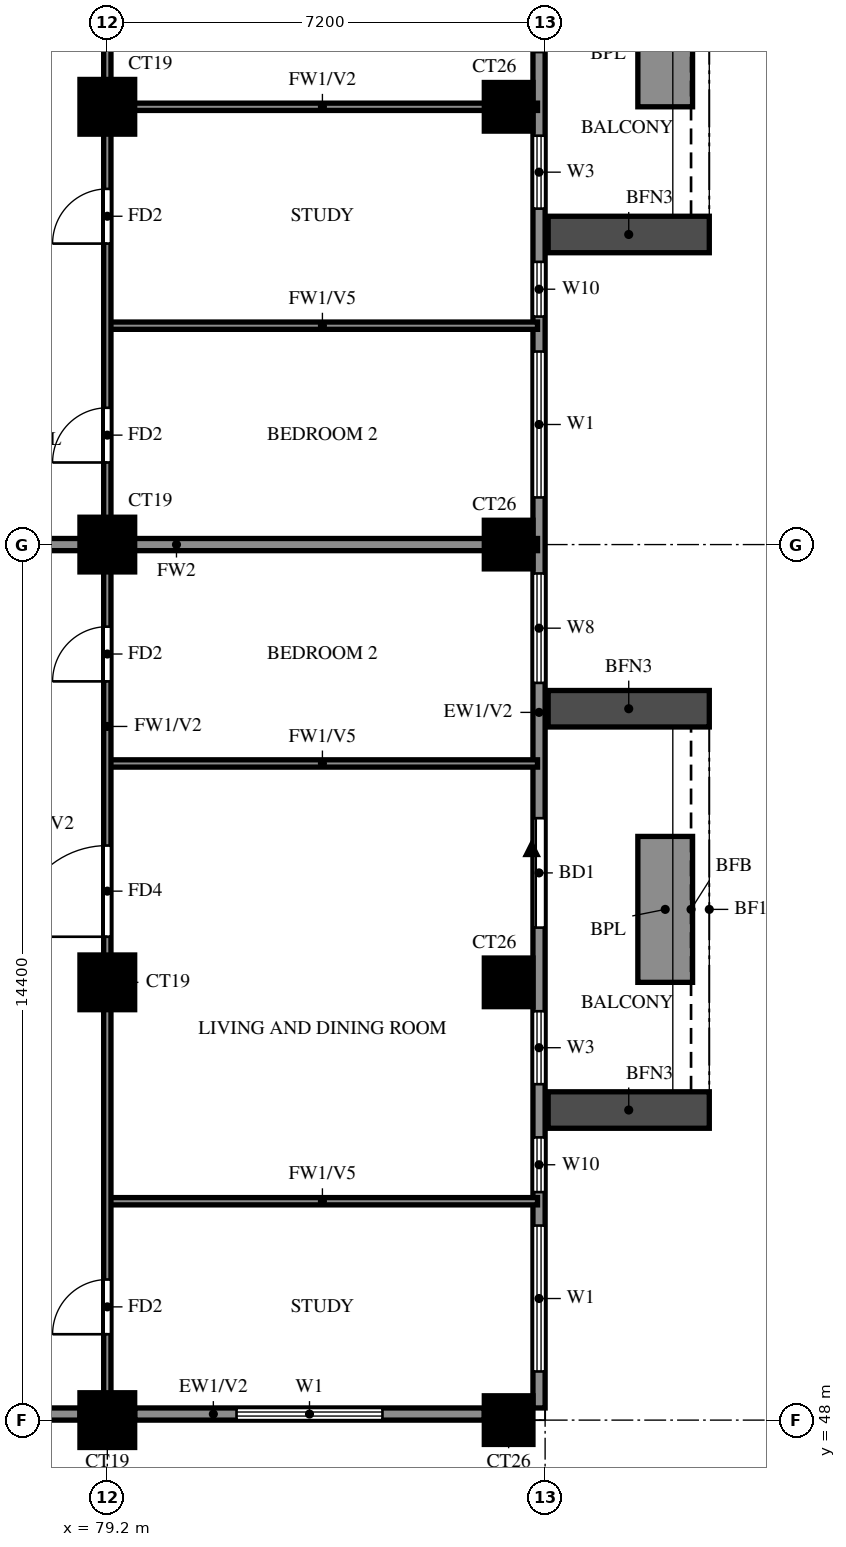
"""IFC4 building model, lengths in metres.
Left out: names, types, materials, properties, quantities, classifications, styles, units other than length and angle.
Written with IfcOpenShell. Run it as: python <this file> out.ifc"""

import sys

from ifc_helpers import new_model, si_unit, direction, frame, frame_2d, origin, origin_2d, place, context, subcontext, project, spatial, rectangle, extrude, source, transform, mapped, element, fill, save


model = new_model("IFC4")
c1 = context("Model", 3, precision=1e-05, world=origin(), true_north=direction((0.0, 1.0)))
c2 = subcontext(c1, "Body", "Model", "MODEL_VIEW")
j1 = project(units=[si_unit("LENGTHUNIT", "METRE"), si_unit("PLANEANGLEUNIT", "RADIAN")], contexts=[c1])
p1 = place(None, origin())
s1 = spatial("IfcSite", under=j1, at=p1, CompositionType="ELEMENT")
p2 = place(p1, origin())
s2 = spatial("IfcBuilding", under=s1, at=p2, CompositionType="ELEMENT")
p3 = place(p2, frame((0.0, 0.0, 185.0)))
s3 = spatial("IfcBuildingStorey", under=s2, at=p3, CompositionType="ELEMENT", Elevation=185.0)
m1 = source(origin(), c2, "Body", "SweptSolid", [
    extrude(rectangle(XDim=0.9, YDim=0.9, at=origin_2d()), origin(), (0.0, 0.0, 1.0), 3.2),
])
p4 = place(p3, frame((79.2, 48.0, 0.0), z_axis=(0.0, 0.0, 1.0), x_axis=(1.0, 0.0, 0.0)))
e1 = element("IfcColumn", 1, at=p4, inside=s3, PredefinedType="COLUMN", context=c2, shape_type="MappedRepresentation", body=[
    mapped(m1, transform((0.0, 0.0, 0.0))),
])
m2 = source(origin(), c2, "Body", "SweptSolid", [
    extrude(rectangle(XDim=0.8, YDim=0.8, at=origin_2d()), origin(), (0.0, 0.0, 1.0), 3.2),
])
p5 = place(p3, frame((85.8, 48.0, 0.0), z_axis=(0.0, 0.0, 1.0), x_axis=(1.0, 0.0, 0.0)))
e2 = element("IfcColumn", 2, at=p5, inside=s3, PredefinedType="COLUMN", context=c2, shape_type="MappedRepresentation", body=[
    mapped(m2, transform((0.0, 0.0, 0.0))),
])
p6 = place(p3, frame((79.2, 55.2, 0.0), z_axis=(0.0, 0.0, 1.0), x_axis=(1.0, 0.0, 0.0)))
e3 = element("IfcColumn", 3, at=p6, inside=s3, PredefinedType="COLUMN", context=c2, shape_type="MappedRepresentation", body=[
    mapped(m1, transform((0.0, 0.0, 0.0))),
])
p7 = place(p3, frame((85.8, 55.2, 0.0), z_axis=(0.0, 0.0, 1.0), x_axis=(1.0, 0.0, 0.0)))
e4 = element("IfcColumn", 4, at=p7, inside=s3, PredefinedType="COLUMN", context=c2, shape_type="MappedRepresentation", body=[
    mapped(m2, transform((0.0, 0.0, 0.0))),
])
p8 = place(p3, frame((79.2, 62.4, 0.0), z_axis=(0.0, 0.0, 1.0), x_axis=(1.0, 0.0, 0.0)))
e5 = element("IfcColumn", 5, at=p8, inside=s3, PredefinedType="COLUMN", context=c2, shape_type="MappedRepresentation", body=[
    mapped(m1, transform((0.0, 0.0, 0.0))),
])
p9 = place(p3, frame((85.8, 62.4, 0.0), z_axis=(0.0, 0.0, 1.0), x_axis=(1.0, 0.0, 0.0)))
e6 = element("IfcColumn", 6, at=p9, inside=s3, PredefinedType="COLUMN", context=c2, shape_type="MappedRepresentation", body=[
    mapped(m2, transform((0.0, 0.0, 0.0))),
])
p10 = place(p3, frame((79.2, 69.6, 0.0), z_axis=(0.0, 0.0, 1.0), x_axis=(1.0, 0.0, 0.0)))
e7 = element("IfcColumn", 7, at=p10, inside=s3, PredefinedType="COLUMN", context=c2, shape_type="MappedRepresentation", body=[
    mapped(m1, transform((0.0, 0.0, 0.0))),
])
p11 = place(p3, frame((85.8, 69.6, 0.0), z_axis=(0.0, 0.0, 1.0), x_axis=(1.0, 0.0, 0.0)))
e8 = element("IfcColumn", 8, at=p11, inside=s3, PredefinedType="COLUMN", context=c2, shape_type="MappedRepresentation", body=[
    mapped(m2, transform((0.0, 0.0, 0.0))),
])
p12 = place(p3, frame((85.719, 39.881, 0.0), z_axis=(0.0, 0.0, 1.0), x_axis=(-0.86377618652, 0.503875678716, 0.0)))
e9 = element("IfcWall", 9, at=p12, inside=s3, PredefinedType="SOLIDWALL", context=c2, shape_type="SweptSolid", body=[
    extrude(rectangle(XDim=16.311, YDim=0.2, at=frame_2d((8.156, 0.0))), origin(), (0.0, 0.0, 1.0), 3.2),
])
p13 = place(p12, frame((13.326, 0.0, 1.5)))
e10 = element("IfcOpeningElement", 10, at=p13, cuts=e9, PredefinedType="OPENING", context=c2, shape_type="SweptSolid", body=[
    extrude(rectangle(XDim=0.9, YDim=0.9, at=frame_2d((0.45, 0.45))), frame((0.0, 0.11, 0.0), z_axis=(0.0, -1.0, 0.0), x_axis=(1.0, 0.0, 0.0)), (0.0, 0.0, 1.0), 0.22),
])
p14 = place(p3, frame((71.99, 48.1, 0.0), z_axis=(0.0, 0.0, 1.0), x_axis=(1.0, 0.0, 0.0)))
e11 = element("IfcWall", 11, at=p14, inside=s3, PredefinedType="SOLIDWALL", context=c2, shape_type="SweptSolid", body=[
    extrude(rectangle(XDim=6.76, YDim=0.2, at=frame_2d((3.38, 0.0))), origin(), (0.0, 0.0, 1.0), 3.2),
])
p15 = place(p14, frame((2.205, 0.0, 1.5)))
e12 = element("IfcOpeningElement", 12, at=p15, cuts=e11, PredefinedType="OPENING", context=c2, shape_type="SweptSolid", body=[
    extrude(rectangle(XDim=0.9, YDim=0.9, at=frame_2d((0.45, 0.45))), frame((0.0, 0.11, 0.0), z_axis=(0.0, -1.0, 0.0), x_axis=(1.0, 0.0, 0.0)), (0.0, 0.0, 1.0), 0.22),
])
p16 = place(p3, frame((79.65, 48.1, 0.0), z_axis=(0.0, 0.0, 1.0), x_axis=(1.0, 0.0, 0.0)))
e13 = element("IfcWall", 13, at=p16, inside=s3, PredefinedType="SOLIDWALL", context=c2, shape_type="SweptSolid", body=[
    extrude(rectangle(XDim=5.75, YDim=0.2, at=frame_2d((2.875, 0.0))), origin(), (0.0, 0.0, 1.0), 3.2),
])
p17 = place(p16, frame((1.675, 0.0, 0.6)))
e14 = element("IfcOpeningElement", 14, at=p17, cuts=e13, PredefinedType="OPENING", context=c2, shape_type="SweptSolid", body=[
    extrude(rectangle(XDim=2.4, YDim=2.4, at=frame_2d((1.2, 1.2))), frame((0.0, 0.11, 0.0), z_axis=(0.0, -1.0, 0.0), x_axis=(1.0, 0.0, 0.0)), (0.0, 0.0, 1.0), 0.22),
])
p18 = place(p3, frame((86.3, 48.2, 0.0), z_axis=(0.0, 0.0, 1.0), x_axis=(0.0, 1.0, 0.0)))
e15 = element("IfcWall", 15, at=p18, inside=s3, PredefinedType="SOLIDWALL", context=c2, shape_type="SweptSolid", body=[
    extrude(rectangle(XDim=28.6, YDim=0.2, at=frame_2d((14.3, 0.0))), origin(), (0.0, 0.0, 1.0), 3.2),
])
p19 = place(p18, frame((7.9, 0.0, 0.0)))
e16 = element("IfcOpeningElement", 16, at=p19, cuts=e15, PredefinedType="OPENING", context=c2, shape_type="SweptSolid", body=[
    extrude(rectangle(XDim=1.8, YDim=2.4, at=frame_2d((0.9, 1.2))), frame((0.0, 0.11, 0.0), z_axis=(0.0, -1.0, 0.0), x_axis=(1.0, 0.0, 0.0)), (0.0, 0.0, 1.0), 0.22),
])
p20 = place(p18, frame((22.3, 0.0, 0.0)))
e17 = element("IfcOpeningElement", 17, at=p20, cuts=e15, PredefinedType="OPENING", context=c2, shape_type="SweptSolid", body=[
    extrude(rectangle(XDim=1.8, YDim=2.4, at=frame_2d((0.9, 1.2))), frame((0.0, 0.11, 0.0), z_axis=(0.0, -1.0, 0.0), x_axis=(1.0, 0.0, 0.0)), (0.0, 0.0, 1.0), 0.22),
])
p21 = place(p18, frame((0.6, 0.0, 0.6)))
e18 = element("IfcOpeningElement", 18, at=p21, cuts=e15, PredefinedType="OPENING", context=c2, shape_type="SweptSolid", body=[
    extrude(rectangle(XDim=2.4, YDim=2.4, at=frame_2d((1.2, 1.2))), frame((0.0, 0.11, 0.0), z_axis=(0.0, -1.0, 0.0), x_axis=(1.0, 0.0, 0.0)), (0.0, 0.0, 1.0), 0.22),
])
p22 = place(p18, frame((3.55, 0.0, 0.6)))
e19 = element("IfcOpeningElement", 19, at=p22, cuts=e15, PredefinedType="OPENING", context=c2, shape_type="SweptSolid", body=[
    extrude(rectangle(XDim=0.9, YDim=2.4, at=frame_2d((0.45, 1.2))), frame((0.0, 0.11, 0.0), z_axis=(0.0, -1.0, 0.0), x_axis=(1.0, 0.0, 0.0)), (0.0, 0.0, 1.0), 0.22),
])
p23 = place(p18, frame((5.325, 0.0, 0.6)))
e20 = element("IfcOpeningElement", 20, at=p23, cuts=e15, PredefinedType="OPENING", context=c2, shape_type="SweptSolid", body=[
    extrude(rectangle(XDim=1.2, YDim=2.4, at=frame_2d((0.6, 1.2))), frame((0.0, 0.11, 0.0), z_axis=(0.0, -1.0, 0.0), x_axis=(1.0, 0.0, 0.0)), (0.0, 0.0, 1.0), 0.22),
])
p24 = place(p18, frame((11.925, 0.0, 0.6)))
e21 = element("IfcOpeningElement", 21, at=p24, cuts=e15, PredefinedType="OPENING", context=c2, shape_type="SweptSolid", body=[
    extrude(rectangle(XDim=1.8, YDim=2.4, at=frame_2d((0.9, 1.2))), frame((0.0, 0.11, 0.0), z_axis=(0.0, -1.0, 0.0), x_axis=(1.0, 0.0, 0.0)), (0.0, 0.0, 1.0), 0.22),
])
p25 = place(p18, frame((14.975, 0.0, 0.6)))
e22 = element("IfcOpeningElement", 22, at=p25, cuts=e15, PredefinedType="OPENING", context=c2, shape_type="SweptSolid", body=[
    extrude(rectangle(XDim=2.4, YDim=2.4, at=frame_2d((1.2, 1.2))), frame((0.0, 0.11, 0.0), z_axis=(0.0, -1.0, 0.0), x_axis=(1.0, 0.0, 0.0)), (0.0, 0.0, 1.0), 0.22),
])
p26 = place(p18, frame((17.95, 0.0, 0.6)))
e23 = element("IfcOpeningElement", 23, at=p26, cuts=e15, PredefinedType="OPENING", context=c2, shape_type="SweptSolid", body=[
    extrude(rectangle(XDim=0.9, YDim=2.4, at=frame_2d((0.45, 1.2))), frame((0.0, 0.11, 0.0), z_axis=(0.0, -1.0, 0.0), x_axis=(1.0, 0.0, 0.0)), (0.0, 0.0, 1.0), 0.22),
])
p27 = place(p18, frame((19.725, 0.0, 0.6)))
e24 = element("IfcOpeningElement", 24, at=p27, cuts=e15, PredefinedType="OPENING", context=c2, shape_type="SweptSolid", body=[
    extrude(rectangle(XDim=1.2, YDim=2.4, at=frame_2d((0.6, 1.2))), frame((0.0, 0.11, 0.0), z_axis=(0.0, -1.0, 0.0), x_axis=(1.0, 0.0, 0.0)), (0.0, 0.0, 1.0), 0.22),
])
p28 = place(p18, frame((26.325, 0.0, 0.6)))
e25 = element("IfcOpeningElement", 25, at=p28, cuts=e15, PredefinedType="OPENING", context=c2, shape_type="SweptSolid", body=[
    extrude(rectangle(XDim=1.8, YDim=2.4, at=frame_2d((0.9, 1.2))), frame((0.0, 0.11, 0.0), z_axis=(0.0, -1.0, 0.0), x_axis=(1.0, 0.0, 0.0)), (0.0, 0.0, 1.0), 0.22),
])
for number, where, z_axis, x_axis in (
    (26, (86.45, 53.1, 0.0), (0.0, 0.0, 1.0), (1.0, 0.0, 0.0)),
    (27, (86.45, 59.7, 0.0), (0.0, 0.0, 1.0), (1.0, 0.0, 0.0)),
):
    element("IfcWall", number, at=place(p3, frame(where, z_axis=z_axis, x_axis=x_axis)), inside=s3, PredefinedType="SOLIDWALL", context=c2, shape_type="SweptSolid", body=[
        extrude(rectangle(XDim=2.65, YDim=0.6, at=frame_2d((1.325, 0.0))), origin(), (0.0, 0.0, 1.0), 2.85),
    ])
p29 = place(p3, frame((88.375, 55.2, 0.0), z_axis=(0.0, 0.0, 1.0), x_axis=(0.0, 1.0, 0.0)))
e28 = element("IfcWall", 28, at=p29, inside=s3, PredefinedType="SOLIDWALL", context=c2, shape_type="SweptSolid", body=[
    extrude(rectangle(XDim=2.4, YDim=0.9, at=frame_2d((1.2, 0.0))), origin(), (0.0, 0.0, 1.0), 0.9),
])
p30 = place(p3, frame((86.45, 67.5, 0.0), z_axis=(0.0, 0.0, 1.0), x_axis=(1.0, 0.0, 0.0)))
e29 = element("IfcWall", 29, at=p30, inside=s3, PredefinedType="SOLIDWALL", context=c2, shape_type="SweptSolid", body=[
    extrude(rectangle(XDim=2.65, YDim=0.6, at=frame_2d((1.325, 0.0))), origin(), (0.0, 0.0, 1.0), 2.85),
])
p31 = place(p3, frame((88.375, 69.6, 0.0), z_axis=(0.0, 0.0, 1.0), x_axis=(0.0, 1.0, 0.0)))
e30 = element("IfcWall", 30, at=p31, inside=s3, PredefinedType="SOLIDWALL", context=c2, shape_type="SweptSolid", body=[
    extrude(rectangle(XDim=2.4, YDim=0.9, at=frame_2d((1.2, 0.0))), origin(), (0.0, 0.0, 1.0), 0.9),
])
p32 = place(p3, frame((74.4, 62.4, 0.0), z_axis=(0.0, 0.0, 1.0), x_axis=(1.0, 0.0, 0.0)))
e31 = element("IfcWall", 31, at=p32, inside=s3, PredefinedType="SOLIDWALL", context=c2, shape_type="SweptSolid", body=[
    extrude(rectangle(XDim=11.875, YDim=0.2, at=frame_2d((5.938, 0.0))), origin(), (0.0, 0.0, 1.0), 3.2),
])
for number, where, z_axis, x_axis in (
    (32, (79.2, 51.6, 0.0), (0.0, 0.0, 1.0), (1.0, 0.0, 0.0)),
    (33, (79.2, 58.8, 0.0), (0.0, 0.0, 1.0), (1.0, 0.0, 0.0)),
    (34, (79.2, 66.0, 0.0), (0.0, 0.0, 1.0), (1.0, 0.0, 0.0)),
):
    element("IfcWall", number, at=place(p3, frame(where, z_axis=z_axis, x_axis=x_axis)), inside=s3, PredefinedType="PARTITIONING", context=c2, shape_type="SweptSolid", body=[
        extrude(rectangle(XDim=7.075, YDim=0.12, at=frame_2d((3.538, 0.0))), origin(), (0.0, 0.0, 1.0), 2.3),
    ])
p33 = place(p3, frame((79.2, 69.6, 0.0), z_axis=(0.0, 0.0, 1.0), x_axis=(1.0, 0.0, 0.0)))
e35 = element("IfcWall", 35, at=p33, inside=s3, PredefinedType="PARTITIONING", context=c2, shape_type="SweptSolid", body=[
    extrude(rectangle(XDim=7.075, YDim=0.12, at=frame_2d((3.538, 0.0))), origin(), (0.0, 0.0, 1.0), 3.2),
])
p34 = place(p3, frame((79.2, 48.125, 0.0), z_axis=(0.0, 0.0, 1.0), x_axis=(0.0, 1.0, 0.0)))
e36 = element("IfcWall", 36, at=p34, inside=s3, PredefinedType="PARTITIONING", context=c2, shape_type="SweptSolid", body=[
    extrude(rectangle(XDim=25.075, YDim=0.12, at=frame_2d((12.538, 0.0))), origin(), (0.0, 0.0, 1.0), 3.2),
])
p35 = place(p34, frame((1.288, 0.0, 0.0)))
e37 = element("IfcOpeningElement", 37, at=p35, cuts=e36, PredefinedType="OPENING", context=c2, shape_type="SweptSolid", body=[
    extrude(rectangle(XDim=0.9, YDim=2.1, at=frame_2d((0.45, 1.05))), frame((0.0, 0.07, 0.0), z_axis=(0.0, -1.0, 0.0), x_axis=(1.0, 0.0, 0.0)), (0.0, 0.0, 1.0), 0.14),
])
p36 = place(p34, frame((7.825, 0.0, 0.0)))
e38 = element("IfcOpeningElement", 38, at=p36, cuts=e36, PredefinedType="OPENING", context=c2, shape_type="SweptSolid", body=[
    extrude(rectangle(XDim=1.5, YDim=2.1, at=frame_2d((0.75, 1.05))), frame((0.0, 0.07, 0.0), z_axis=(0.0, -1.0, 0.0), x_axis=(1.0, 0.0, 0.0)), (0.0, 0.0, 1.0), 0.14),
])
p37 = place(p34, frame((12.025, 0.0, 0.0)))
e39 = element("IfcOpeningElement", 39, at=p37, cuts=e36, PredefinedType="OPENING", context=c2, shape_type="SweptSolid", body=[
    extrude(rectangle(XDim=0.9, YDim=2.1, at=frame_2d((0.45, 1.05))), frame((0.0, 0.07, 0.0), z_axis=(0.0, -1.0, 0.0), x_axis=(1.0, 0.0, 0.0)), (0.0, 0.0, 1.0), 0.14),
])
p38 = place(p34, frame((15.625, 0.0, 0.0)))
e40 = element("IfcOpeningElement", 40, at=p38, cuts=e36, PredefinedType="OPENING", context=c2, shape_type="SweptSolid", body=[
    extrude(rectangle(XDim=0.9, YDim=2.1, at=frame_2d((0.45, 1.05))), frame((0.0, 0.07, 0.0), z_axis=(0.0, -1.0, 0.0), x_axis=(1.0, 0.0, 0.0)), (0.0, 0.0, 1.0), 0.14),
])
p39 = place(p34, frame((19.225, 0.0, 0.0)))
e41 = element("IfcOpeningElement", 41, at=p39, cuts=e36, PredefinedType="OPENING", context=c2, shape_type="SweptSolid", body=[
    extrude(rectangle(XDim=0.9, YDim=2.1, at=frame_2d((0.45, 1.05))), frame((0.0, 0.07, 0.0), z_axis=(0.0, -1.0, 0.0), x_axis=(1.0, 0.0, 0.0)), (0.0, 0.0, 1.0), 0.14),
])
p40 = place(p34, frame((22.825, 0.0, 0.0)))
e42 = element("IfcOpeningElement", 42, at=p40, cuts=e36, PredefinedType="OPENING", context=c2, shape_type="SweptSolid", body=[
    extrude(rectangle(XDim=0.9, YDim=2.1, at=frame_2d((0.45, 1.05))), frame((0.0, 0.07, 0.0), z_axis=(0.0, -1.0, 0.0), x_axis=(1.0, 0.0, 0.0)), (0.0, 0.0, 1.0), 0.14),
])
p41 = place(p17, origin())
e43 = element("IfcWindow", 43, at=p41, inside=s3, PartitioningType="DOUBLE_PANEL_VERTICAL", PredefinedType="WINDOW", context=c2, shape_type="SweptSolid", body=[
    extrude(rectangle(XDim=2.4, YDim=2.4, at=frame_2d((1.2, 1.2))), frame((0.0, 0.03, 0.0), z_axis=(0.0, -1.0, 0.0), x_axis=(1.0, 0.0, 0.0)), (0.0, 0.0, 1.0), 0.06),
])
fill(e14, e43)
p42 = place(p19, origin())
e44 = element("IfcDoor", 44, at=p42, inside=s3, OperationType="DOUBLE_DOOR_SLIDING", PredefinedType="DOOR", context=c2, shape_type="SweptSolid", body=[
    extrude(rectangle(XDim=1.8, YDim=2.4, at=frame_2d((0.9, 1.2))), frame((0.0, 0.025, 0.0), z_axis=(0.0, -1.0, 0.0), x_axis=(1.0, 0.0, 0.0)), (0.0, 0.0, 1.0), 0.05),
])
fill(e16, e44)
p43 = place(p20, origin())
e45 = element("IfcDoor", 45, at=p43, inside=s3, OperationType="DOUBLE_DOOR_SLIDING", PredefinedType="DOOR", context=c2, shape_type="SweptSolid", body=[
    extrude(rectangle(XDim=1.8, YDim=2.4, at=frame_2d((0.9, 1.2))), frame((0.0, 0.025, 0.0), z_axis=(0.0, -1.0, 0.0), x_axis=(1.0, 0.0, 0.0)), (0.0, 0.0, 1.0), 0.05),
])
fill(e17, e45)
p44 = place(p21, origin())
e46 = element("IfcWindow", 46, at=p44, inside=s3, PartitioningType="DOUBLE_PANEL_VERTICAL", PredefinedType="WINDOW", context=c2, shape_type="SweptSolid", body=[
    extrude(rectangle(XDim=2.4, YDim=2.4, at=frame_2d((1.2, 1.2))), frame((0.0, 0.03, 0.0), z_axis=(0.0, -1.0, 0.0), x_axis=(1.0, 0.0, 0.0)), (0.0, 0.0, 1.0), 0.06),
])
fill(e18, e46)
p45 = place(p22, origin())
e47 = element("IfcWindow", 47, at=p45, inside=s3, PartitioningType="SINGLE_PANEL", PredefinedType="WINDOW", context=c2, shape_type="SweptSolid", body=[
    extrude(rectangle(XDim=0.9, YDim=2.4, at=frame_2d((0.45, 1.2))), frame((0.0, 0.03, 0.0), z_axis=(0.0, -1.0, 0.0), x_axis=(1.0, 0.0, 0.0)), (0.0, 0.0, 1.0), 0.06),
])
fill(e19, e47)
p46 = place(p23, origin())
e48 = element("IfcWindow", 48, at=p46, inside=s3, PartitioningType="SINGLE_PANEL", PredefinedType="WINDOW", context=c2, shape_type="SweptSolid", body=[
    extrude(rectangle(XDim=1.2, YDim=2.4, at=frame_2d((0.6, 1.2))), frame((0.0, 0.03, 0.0), z_axis=(0.0, -1.0, 0.0), x_axis=(1.0, 0.0, 0.0)), (0.0, 0.0, 1.0), 0.06),
])
fill(e20, e48)
p47 = place(p24, origin())
e49 = element("IfcWindow", 49, at=p47, inside=s3, PartitioningType="DOUBLE_PANEL_VERTICAL", PredefinedType="WINDOW", context=c2, shape_type="SweptSolid", body=[
    extrude(rectangle(XDim=1.8, YDim=2.4, at=frame_2d((0.9, 1.2))), frame((0.0, 0.03, 0.0), z_axis=(0.0, -1.0, 0.0), x_axis=(1.0, 0.0, 0.0)), (0.0, 0.0, 1.0), 0.06),
])
fill(e21, e49)
p48 = place(p25, origin())
e50 = element("IfcWindow", 50, at=p48, inside=s3, PartitioningType="DOUBLE_PANEL_VERTICAL", PredefinedType="WINDOW", context=c2, shape_type="SweptSolid", body=[
    extrude(rectangle(XDim=2.4, YDim=2.4, at=frame_2d((1.2, 1.2))), frame((0.0, 0.03, 0.0), z_axis=(0.0, -1.0, 0.0), x_axis=(1.0, 0.0, 0.0)), (0.0, 0.0, 1.0), 0.06),
])
fill(e22, e50)
p49 = place(p26, origin())
e51 = element("IfcWindow", 51, at=p49, inside=s3, PartitioningType="SINGLE_PANEL", PredefinedType="WINDOW", context=c2, shape_type="SweptSolid", body=[
    extrude(rectangle(XDim=0.9, YDim=2.4, at=frame_2d((0.45, 1.2))), frame((0.0, 0.03, 0.0), z_axis=(0.0, -1.0, 0.0), x_axis=(1.0, 0.0, 0.0)), (0.0, 0.0, 1.0), 0.06),
])
fill(e23, e51)
p50 = place(p27, origin())
e52 = element("IfcWindow", 52, at=p50, inside=s3, PartitioningType="SINGLE_PANEL", PredefinedType="WINDOW", context=c2, shape_type="SweptSolid", body=[
    extrude(rectangle(XDim=1.2, YDim=2.4, at=frame_2d((0.6, 1.2))), frame((0.0, 0.03, 0.0), z_axis=(0.0, -1.0, 0.0), x_axis=(1.0, 0.0, 0.0)), (0.0, 0.0, 1.0), 0.06),
])
fill(e24, e52)
p51 = place(p35, origin())
e53 = element("IfcDoor", 53, at=p51, inside=s3, OperationType="SINGLE_SWING_LEFT", PredefinedType="DOOR", context=c2, shape_type="SweptSolid", body=[
    extrude(rectangle(XDim=0.9, YDim=2.1, at=frame_2d((0.45, 1.05))), frame((0.0, 0.025, 0.0), z_axis=(0.0, -1.0, 0.0), x_axis=(1.0, 0.0, 0.0)), (0.0, 0.0, 1.0), 0.05),
])
fill(e37, e53)
p52 = place(p36, origin())
e54 = element("IfcDoor", 54, at=p52, inside=s3, OperationType="SINGLE_SWING_RIGHT", PredefinedType="DOOR", context=c2, shape_type="SweptSolid", body=[
    extrude(rectangle(XDim=1.5, YDim=2.1, at=frame_2d((0.75, 1.05))), frame((0.0, 0.025, 0.0), z_axis=(0.0, -1.0, 0.0), x_axis=(1.0, 0.0, 0.0)), (0.0, 0.0, 1.0), 0.05),
])
fill(e38, e54)
p53 = place(p37, origin())
e55 = element("IfcDoor", 55, at=p53, inside=s3, OperationType="SINGLE_SWING_RIGHT", PredefinedType="DOOR", context=c2, shape_type="SweptSolid", body=[
    extrude(rectangle(XDim=0.9, YDim=2.1, at=frame_2d((0.45, 1.05))), frame((0.0, 0.025, 0.0), z_axis=(0.0, -1.0, 0.0), x_axis=(1.0, 0.0, 0.0)), (0.0, 0.0, 1.0), 0.05),
])
fill(e39, e55)
p54 = place(p38, origin())
e56 = element("IfcDoor", 56, at=p54, inside=s3, OperationType="SINGLE_SWING_RIGHT", PredefinedType="DOOR", context=c2, shape_type="SweptSolid", body=[
    extrude(rectangle(XDim=0.9, YDim=2.1, at=frame_2d((0.45, 1.05))), frame((0.0, 0.025, 0.0), z_axis=(0.0, -1.0, 0.0), x_axis=(1.0, 0.0, 0.0)), (0.0, 0.0, 1.0), 0.05),
])
fill(e40, e56)
p55 = place(p39, origin())
e57 = element("IfcDoor", 57, at=p55, inside=s3, OperationType="SINGLE_SWING_LEFT", PredefinedType="DOOR", context=c2, shape_type="SweptSolid", body=[
    extrude(rectangle(XDim=0.9, YDim=2.1, at=frame_2d((0.45, 1.05))), frame((0.0, 0.025, 0.0), z_axis=(0.0, -1.0, 0.0), x_axis=(1.0, 0.0, 0.0)), (0.0, 0.0, 1.0), 0.05),
])
fill(e41, e57)
save(model, sys.argv[1])
